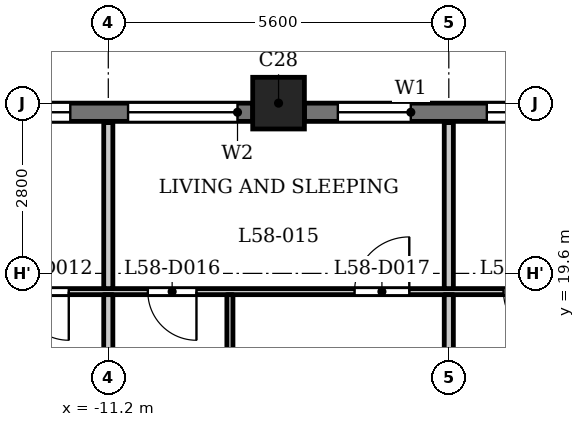
"""IFC4 building model, lengths in metres.
Left out: names, types, materials, properties, quantities, classifications, styles, units other than length and angle.
Written with IfcOpenShell. Run it as: python <this file> out.ifc"""

import sys

from ifc_helpers import new_model, si_unit, direction, frame, frame_2d, origin, origin_2d, place, context, subcontext, project, spatial, rectangle, extrude, element, fill, save


model = new_model("IFC4")
c1 = context("Model", 3, precision=1e-05, world=origin(), true_north=direction((0.0, 1.0)))
c2 = subcontext(c1, "Body", "Model", "MODEL_VIEW")
j1 = project(units=[si_unit("LENGTHUNIT", "METRE"), si_unit("PLANEANGLEUNIT", "RADIAN")], contexts=[c1])
p1 = place(None, origin())
s1 = spatial("IfcSite", under=j1, at=p1, CompositionType="ELEMENT")
p2 = place(p1, origin())
s2 = spatial("IfcBuilding", under=s1, at=p2, CompositionType="ELEMENT")
p3 = place(p2, frame((0.0, 0.0, 223.9)))
s3 = spatial("IfcBuildingStorey", under=s2, at=p3, CompositionType="ELEMENT", Elevation=223.9)
p4 = place(p3, frame((-8.4, 22.4, 0.0), z_axis=(0.0, 0.0, 1.0), x_axis=(1.0, 0.0, 0.0)))
e1 = element("IfcColumn", 1, at=p4, inside=s3, PredefinedType="COLUMN", context=c2, shape_type="SweptSolid", body=[
    extrude(rectangle(XDim=0.85, YDim=0.85, at=origin_2d()), origin(), (0.0, 0.0, 1.0), 3.5),
])
p5 = place(p3, frame((-3.225, 22.25, 0.0), z_axis=(0.0, 0.0, 1.0), x_axis=(-1.0, 0.0, 0.0)))
e2 = element("IfcWall", 2, at=p5, inside=s3, PredefinedType="SOLIDWALL", context=c2, shape_type="SweptSolid", body=[
    extrude(rectangle(XDim=4.75, YDim=0.3, at=frame_2d((2.375, 0.0))), origin(), (0.0, 0.0, 1.0), 2.5),
])
p6 = place(p5, frame((0.55, 0.0, 0.6)))
e3 = element("IfcOpeningElement", 3, at=p6, cuts=e2, PredefinedType="OPENING", context=c2, shape_type="SweptSolid", body=[
    extrude(rectangle(XDim=1.2, YDim=1.55, at=frame_2d((0.6, 0.775))), frame((0.0, 0.16, 0.0), z_axis=(0.0, -1.0, 0.0), x_axis=(1.0, 0.0, 0.0)), (0.0, 0.0, 1.0), 0.32),
])
p7 = place(p5, frame((3.0, 0.0, 0.6)))
e4 = element("IfcOpeningElement", 4, at=p7, cuts=e2, PredefinedType="OPENING", context=c2, shape_type="SweptSolid", body=[
    extrude(rectangle(XDim=1.2, YDim=1.55, at=frame_2d((0.6, 0.775))), frame((0.0, 0.16, 0.0), z_axis=(0.0, -1.0, 0.0), x_axis=(1.0, 0.0, 0.0)), (0.0, 0.0, 1.0), 0.32),
])
p8 = place(p3, frame((-8.825, 22.25, 0.0), z_axis=(0.0, 0.0, 1.0), x_axis=(-1.0, 0.0, 0.0)))
e5 = element("IfcWall", 5, at=p8, inside=s3, PredefinedType="SOLIDWALL", context=c2, shape_type="SweptSolid", body=[
    extrude(rectangle(XDim=4.75, YDim=0.3, at=frame_2d((2.375, 0.0))), origin(), (0.0, 0.0, 1.0), 2.5),
])
p9 = place(p8, frame((0.25, 0.0, 0.9)))
e6 = element("IfcOpeningElement", 6, at=p9, cuts=e5, PredefinedType="OPENING", context=c2, shape_type="SweptSolid", body=[
    extrude(rectangle(XDim=1.8, YDim=1.25, at=frame_2d((0.9, 0.625))), frame((0.0, 0.16, 0.0), z_axis=(0.0, -1.0, 0.0), x_axis=(1.0, 0.0, 0.0)), (0.0, 0.0, 1.0), 0.32),
])
p10 = place(p8, frame((3.0, 0.0, 0.6)))
e7 = element("IfcOpeningElement", 7, at=p10, cuts=e5, PredefinedType="OPENING", context=c2, shape_type="SweptSolid", body=[
    extrude(rectangle(XDim=1.2, YDim=1.55, at=frame_2d((0.6, 0.775))), frame((0.0, 0.16, 0.0), z_axis=(0.0, -1.0, 0.0), x_axis=(1.0, 0.0, 0.0)), (0.0, 0.0, 1.0), 0.32),
])
p11 = place(p3, frame((-22.256, 19.3, 0.0), z_axis=(0.0, 0.0, 1.0), x_axis=(1.0, 0.0, 0.0)))
e8 = element("IfcWall", 8, at=p11, inside=s3, PredefinedType="PARTITIONING", context=c2, shape_type="SweptSolid", body=[
    extrude(rectangle(XDim=44.511, YDim=0.1, at=frame_2d((22.256, 0.0))), origin(), (0.0, 0.0, 1.0), 3.2),
])
p12 = place(p11, frame((9.606, 0.0, 0.0)))
e9 = element("IfcOpeningElement", 9, at=p12, cuts=e8, PredefinedType="OPENING", context=c2, shape_type="SweptSolid", body=[
    extrude(rectangle(XDim=0.8, YDim=2.1, at=frame_2d((0.4, 1.05))), frame((0.0, 0.06, 0.0), z_axis=(0.0, -1.0, 0.0), x_axis=(1.0, 0.0, 0.0)), (0.0, 0.0, 1.0), 0.12),
])
p13 = place(p11, frame((3.906, 0.0, 0.0)))
e10 = element("IfcOpeningElement", 10, at=p13, cuts=e8, PredefinedType="OPENING", context=c2, shape_type="SweptSolid", body=[
    extrude(rectangle(XDim=0.9, YDim=2.1, at=frame_2d((0.45, 1.05))), frame((0.0, 0.06, 0.0), z_axis=(0.0, -1.0, 0.0), x_axis=(1.0, 0.0, 0.0)), (0.0, 0.0, 1.0), 0.12),
])
p14 = place(p11, frame((11.706, 0.0, 0.0)))
e11 = element("IfcOpeningElement", 11, at=p14, cuts=e8, PredefinedType="OPENING", context=c2, shape_type="SweptSolid", body=[
    extrude(rectangle(XDim=0.8, YDim=2.1, at=frame_2d((0.4, 1.05))), frame((0.0, 0.06, 0.0), z_axis=(0.0, -1.0, 0.0), x_axis=(1.0, 0.0, 0.0)), (0.0, 0.0, 1.0), 0.12),
])
p15 = place(p11, frame((15.106, 0.0, 0.0)))
e12 = element("IfcOpeningElement", 12, at=p15, cuts=e8, PredefinedType="OPENING", context=c2, shape_type="SweptSolid", body=[
    extrude(rectangle(XDim=0.9, YDim=2.1, at=frame_2d((0.45, 1.05))), frame((0.0, 0.06, 0.0), z_axis=(0.0, -1.0, 0.0), x_axis=(1.0, 0.0, 0.0)), (0.0, 0.0, 1.0), 0.12),
])
p16 = place(p11, frame((17.556, 0.0, 0.0)))
e13 = element("IfcOpeningElement", 13, at=p16, cuts=e8, PredefinedType="OPENING", context=c2, shape_type="SweptSolid", body=[
    extrude(rectangle(XDim=0.8, YDim=2.1, at=frame_2d((0.4, 1.05))), frame((0.0, 0.06, 0.0), z_axis=(0.0, -1.0, 0.0), x_axis=(1.0, 0.0, 0.0)), (0.0, 0.0, 1.0), 0.12),
])
p17 = place(p11, frame((19.956, 0.0, 0.0)))
e14 = element("IfcOpeningElement", 14, at=p17, cuts=e8, PredefinedType="OPENING", context=c2, shape_type="SweptSolid", body=[
    extrude(rectangle(XDim=0.9, YDim=2.1, at=frame_2d((0.45, 1.05))), frame((0.0, 0.06, 0.0), z_axis=(0.0, -1.0, 0.0), x_axis=(1.0, 0.0, 0.0)), (0.0, 0.0, 1.0), 0.12),
])
p18 = place(p11, frame((23.456, 0.0, 0.0)))
e15 = element("IfcOpeningElement", 15, at=p18, cuts=e8, PredefinedType="OPENING", context=c2, shape_type="SweptSolid", body=[
    extrude(rectangle(XDim=0.9, YDim=2.1, at=frame_2d((0.45, 1.05))), frame((0.0, 0.06, 0.0), z_axis=(0.0, -1.0, 0.0), x_axis=(1.0, 0.0, 0.0)), (0.0, 0.0, 1.0), 0.12),
])
p19 = place(p11, frame((26.056, 0.0, 0.0)))
e16 = element("IfcOpeningElement", 16, at=p19, cuts=e8, PredefinedType="OPENING", context=c2, shape_type="SweptSolid", body=[
    extrude(rectangle(XDim=0.9, YDim=2.1, at=frame_2d((0.45, 1.05))), frame((0.0, 0.06, 0.0), z_axis=(0.0, -1.0, 0.0), x_axis=(1.0, 0.0, 0.0)), (0.0, 0.0, 1.0), 0.12),
])
p20 = place(p11, frame((28.756, 0.0, 0.0)))
e17 = element("IfcOpeningElement", 17, at=p20, cuts=e8, PredefinedType="OPENING", context=c2, shape_type="SweptSolid", body=[
    extrude(rectangle(XDim=0.8, YDim=2.1, at=frame_2d((0.4, 1.05))), frame((0.0, 0.06, 0.0), z_axis=(0.0, -1.0, 0.0), x_axis=(1.0, 0.0, 0.0)), (0.0, 0.0, 1.0), 0.12),
])
p21 = place(p11, frame((31.156, 0.0, 0.0)))
e18 = element("IfcOpeningElement", 18, at=p21, cuts=e8, PredefinedType="OPENING", context=c2, shape_type="SweptSolid", body=[
    extrude(rectangle(XDim=0.9, YDim=2.1, at=frame_2d((0.45, 1.05))), frame((0.0, 0.06, 0.0), z_axis=(0.0, -1.0, 0.0), x_axis=(1.0, 0.0, 0.0)), (0.0, 0.0, 1.0), 0.12),
])
p22 = place(p11, frame((37.606, 0.0, 0.0)))
e19 = element("IfcOpeningElement", 19, at=p22, cuts=e8, PredefinedType="OPENING", context=c2, shape_type="SweptSolid", body=[
    extrude(rectangle(XDim=0.8, YDim=2.1, at=frame_2d((0.4, 1.05))), frame((0.0, 0.06, 0.0), z_axis=(0.0, -1.0, 0.0), x_axis=(1.0, 0.0, 0.0)), (0.0, 0.0, 1.0), 0.12),
])
p23 = place(p11, frame((42.028, 0.0, 0.0)))
e20 = element("IfcOpeningElement", 20, at=p23, cuts=e8, PredefinedType="OPENING", context=c2, shape_type="SweptSolid", body=[
    extrude(rectangle(XDim=0.9, YDim=2.1, at=frame_2d((0.45, 1.05))), frame((0.0, 0.06, 0.0), z_axis=(0.0, -1.0, 0.0), x_axis=(1.0, 0.0, 0.0)), (0.0, 0.0, 1.0), 0.12),
])
p24 = place(p3, frame((-11.2, 15.475, 0.0), z_axis=(0.0, 0.0, 1.0), x_axis=(0.0, 1.0, 0.0)))
e21 = element("IfcWall", 21, at=p24, inside=s3, PredefinedType="PARTITIONING", context=c2, shape_type="SweptSolid", body=[
    extrude(rectangle(XDim=3.775, YDim=0.15, at=frame_2d((1.887, 0.0))), origin(), (0.0, 0.0, 1.0), 3.2),
])
p25 = place(p3, frame((-11.2, 19.35, 0.0), z_axis=(0.0, 0.0, 1.0), x_axis=(0.0, 1.0, 0.0)))
e22 = element("IfcWall", 22, at=p25, inside=s3, PredefinedType="PARTITIONING", context=c2, shape_type="SweptSolid", body=[
    extrude(rectangle(XDim=2.73, YDim=0.15, at=frame_2d((1.365, 0.0))), origin(), (0.0, 0.0, 1.0), 3.2),
])
p26 = place(p3, frame((-9.2, 15.475, 0.0), z_axis=(0.0, 0.0, 1.0), x_axis=(0.0, 1.0, 0.0)))
e23 = element("IfcWall", 23, at=p26, inside=s3, PredefinedType="PARTITIONING", context=c2, shape_type="SweptSolid", body=[
    extrude(rectangle(XDim=3.775, YDim=0.1, at=frame_2d((1.887, 0.0))), origin(), (0.0, 0.0, 1.0), 3.2),
])
p27 = place(p3, frame((-5.6, 15.475, 0.0), z_axis=(0.0, 0.0, 1.0), x_axis=(0.0, 1.0, 0.0)))
e24 = element("IfcWall", 24, at=p27, inside=s3, PredefinedType="PARTITIONING", context=c2, shape_type="SweptSolid", body=[
    extrude(rectangle(XDim=3.775, YDim=0.15, at=frame_2d((1.887, 0.0))), origin(), (0.0, 0.0, 1.0), 3.2),
])
p28 = place(p3, frame((-5.6, 19.35, 0.0), z_axis=(0.0, 0.0, 1.0), x_axis=(0.0, 1.0, 0.0)))
e25 = element("IfcWall", 25, at=p28, inside=s3, PredefinedType="PARTITIONING", context=c2, shape_type="SweptSolid", body=[
    extrude(rectangle(XDim=2.73, YDim=0.15, at=frame_2d((1.365, 0.0))), origin(), (0.0, 0.0, 1.0), 3.2),
])
p29 = place(p12, origin())
e26 = element("IfcDoor", 26, at=p29, inside=s3, OperationType="SINGLE_SWING_RIGHT", PredefinedType="DOOR", context=c2, shape_type="SweptSolid", body=[
    extrude(rectangle(XDim=0.8, YDim=2.1, at=frame_2d((0.4, 1.05))), frame((0.0, 0.025, 0.0), z_axis=(0.0, -1.0, 0.0), x_axis=(1.0, 0.0, 0.0)), (0.0, 0.0, 1.0), 0.05),
])
fill(e9, e26)
p30 = place(p14, origin())
e27 = element("IfcDoor", 27, at=p30, inside=s3, OperationType="SINGLE_SWING_RIGHT", PredefinedType="DOOR", context=c2, shape_type="SweptSolid", body=[
    extrude(rectangle(XDim=0.8, YDim=2.1, at=frame_2d((0.4, 1.05))), frame((0.0, 0.025, 0.0), z_axis=(0.0, -1.0, 0.0), x_axis=(1.0, 0.0, 0.0)), (0.0, 0.0, 1.0), 0.05),
])
fill(e11, e27)
p31 = place(p15, origin())
e28 = element("IfcDoor", 28, at=p31, inside=s3, OperationType="SINGLE_SWING_LEFT", PredefinedType="DOOR", context=c2, shape_type="SweptSolid", body=[
    extrude(rectangle(XDim=0.9, YDim=2.1, at=frame_2d((0.45, 1.05))), frame((0.0, 0.025, 0.0), z_axis=(0.0, -1.0, 0.0), x_axis=(1.0, 0.0, 0.0)), (0.0, 0.0, 1.0), 0.05),
])
fill(e12, e28)
p32 = place(p16, origin())
e29 = element("IfcDoor", 29, at=p32, inside=s3, OperationType="SINGLE_SWING_RIGHT", PredefinedType="DOOR", context=c2, shape_type="SweptSolid", body=[
    extrude(rectangle(XDim=0.8, YDim=2.1, at=frame_2d((0.4, 1.05))), frame((0.0, 0.025, 0.0), z_axis=(0.0, -1.0, 0.0), x_axis=(1.0, 0.0, 0.0)), (0.0, 0.0, 1.0), 0.05),
])
fill(e13, e29)
p33 = place(p6, origin())
e30 = element("IfcWindow", 30, at=p33, inside=s3, PartitioningType="SINGLE_PANEL", PredefinedType="WINDOW", context=c2, shape_type="SweptSolid", body=[
    extrude(rectangle(XDim=1.2, YDim=1.55, at=frame_2d((0.6, 0.775))), frame((0.0, 0.03, 0.0), z_axis=(0.0, -1.0, 0.0), x_axis=(1.0, 0.0, 0.0)), (0.0, 0.0, 1.0), 0.06),
])
fill(e3, e30)
p34 = place(p7, origin())
e31 = element("IfcWindow", 31, at=p34, inside=s3, PartitioningType="SINGLE_PANEL", PredefinedType="WINDOW", context=c2, shape_type="SweptSolid", body=[
    extrude(rectangle(XDim=1.2, YDim=1.55, at=frame_2d((0.6, 0.775))), frame((0.0, 0.03, 0.0), z_axis=(0.0, -1.0, 0.0), x_axis=(1.0, 0.0, 0.0)), (0.0, 0.0, 1.0), 0.06),
])
fill(e4, e31)
p35 = place(p9, origin())
e32 = element("IfcWindow", 32, at=p35, inside=s3, PartitioningType="SINGLE_PANEL", PredefinedType="WINDOW", context=c2, shape_type="SweptSolid", body=[
    extrude(rectangle(XDim=1.8, YDim=1.25, at=frame_2d((0.9, 0.625))), frame((0.0, 0.03, 0.0), z_axis=(0.0, -1.0, 0.0), x_axis=(1.0, 0.0, 0.0)), (0.0, 0.0, 1.0), 0.06),
])
fill(e6, e32)
p36 = place(p10, origin())
e33 = element("IfcWindow", 33, at=p36, inside=s3, PartitioningType="SINGLE_PANEL", PredefinedType="WINDOW", context=c2, shape_type="SweptSolid", body=[
    extrude(rectangle(XDim=1.2, YDim=1.55, at=frame_2d((0.6, 0.775))), frame((0.0, 0.03, 0.0), z_axis=(0.0, -1.0, 0.0), x_axis=(1.0, 0.0, 0.0)), (0.0, 0.0, 1.0), 0.06),
])
fill(e7, e33)
save(model, sys.argv[1])
